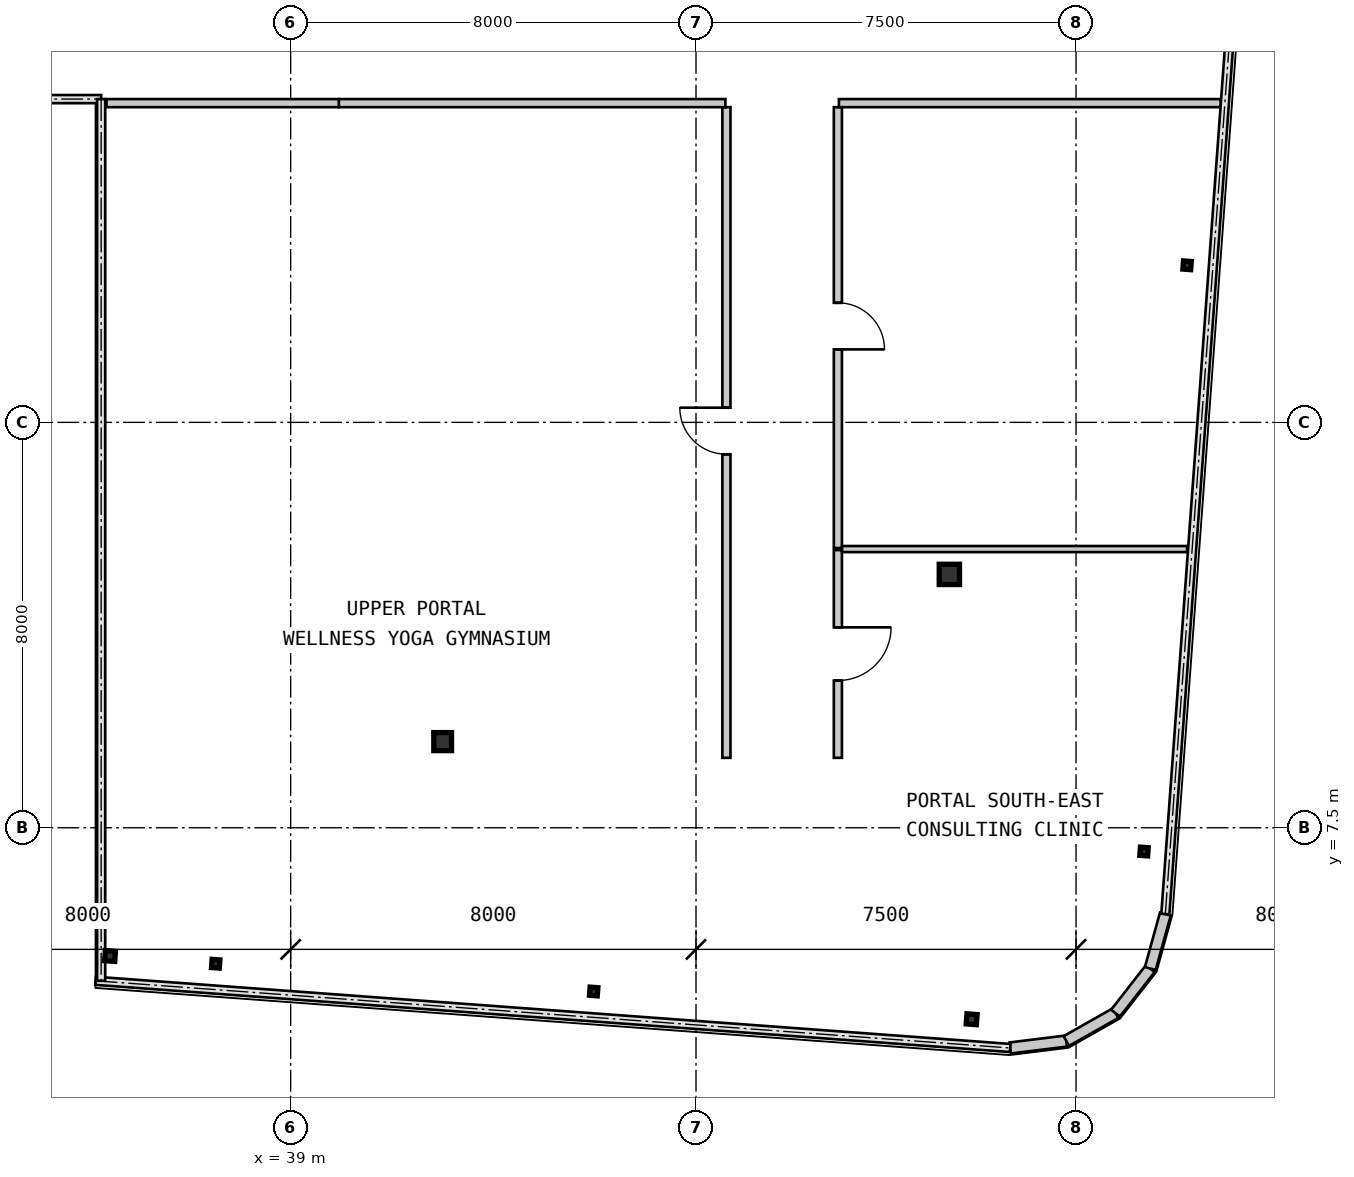
"""IFC4 building model, lengths in metres.
Left out: names, types, materials, properties, quantities, classifications, styles, units other than length and angle.
Written with IfcOpenShell. Run it as: python <this file> out.ifc"""

import sys

from ifc_helpers import new_model, si_unit, direction, frame, frame_2d, origin, origin_2d, place, context, subcontext, project, spatial, rectangle, hollow_rectangle, i_section, extrude, source, transform, mapped, element, fill, save


model = new_model("IFC4")
c1 = context("Model", 3, precision=1e-05, world=origin(), true_north=direction((0.0, 1.0)))
c2 = subcontext(c1, "Body", "Model", "MODEL_VIEW")
j1 = project(units=[si_unit("LENGTHUNIT", "METRE"), si_unit("PLANEANGLEUNIT", "RADIAN")], contexts=[c1])
p1 = place(None, origin())
s1 = spatial("IfcSite", under=j1, at=p1, CompositionType="ELEMENT")
p2 = place(p1, origin())
s2 = spatial("IfcBuilding", under=s1, at=p2, CompositionType="ELEMENT")
p3 = place(p2, frame((0.0, 0.0, 233.45)))
s3 = spatial("IfcBuildingStorey", under=s2, at=p3, CompositionType="ELEMENT", Elevation=233.45)
m1 = source(origin(), c2, "Body", "SweptSolid", [
    extrude(i_section(OverallWidth=0.35, OverallDepth=0.356, WebThickness=0.018, FlangeThickness=0.028, at=origin_2d()), origin(), (0.0, 0.0, 1.0), 3.15),
])
p4 = place(p3, frame((42.0, 9.2, 0.0), z_axis=(0.0, 0.0, 1.0), x_axis=(1.0, 0.0, 0.0)))
e1 = element("IfcColumn", 1, at=p4, inside=s3, PredefinedType="COLUMN", context=c2, shape_type="MappedRepresentation", body=[
    mapped(m1, transform((0.0, 0.0, 0.0), scale=1.0)),
])
m2 = source(origin(), c2, "Body", "SweptSolid", [
    extrude(hollow_rectangle(XDim=0.4, YDim=0.4, WallThickness=0.016, at=origin_2d()), origin(), (0.0, 0.0, 1.0), 3.15),
])
p5 = place(p3, frame((52.0, 12.5, 0.0), z_axis=(0.0, 0.0, 1.0), x_axis=(1.0, 0.0, 0.0)))
e2 = element("IfcColumn", 2, at=p5, inside=s3, PredefinedType="COLUMN", context=c2, shape_type="MappedRepresentation", body=[
    mapped(m2, transform((0.0, 0.0, 0.0), scale=1.0)),
])
m3 = source(origin(), c2, "Body", "SweptSolid", [
    extrude(i_section(OverallWidth=0.154, OverallDepth=0.162, WebThickness=0.008, FlangeThickness=0.011, at=origin_2d()), origin(), (0.0, 0.0, 1.0), 3.15),
])
for number, where, z_axis, x_axis in (
    (3, (37.521, 4.817, 0.0), (0.0, 0.0, 1.0), (0.997, -0.073, 0.0)),
    (4, (44.98, 4.269, 0.0), (0.0, 0.0, 1.0), (0.997, -0.073, 0.0)),
):
    element("IfcColumn", number, at=place(p3, frame(where, z_axis=z_axis, x_axis=x_axis)), inside=s3, PredefinedType="COLUMN", context=c2, shape_type="MappedRepresentation", body=[
        mapped(m3, transform((0.0, 0.0, 0.0), scale=1.0)),
    ])
m4 = source(origin(), c2, "Body", "SweptSolid", [
    extrude(hollow_rectangle(XDim=0.2, YDim=0.2, WallThickness=0.009, at=origin_2d()), origin(), (0.0, 0.0, 1.0), 3.15),
])
p6 = place(p3, frame((52.44, 3.721, 0.0), z_axis=(0.0, 0.0, 1.0), x_axis=(0.997314477224, -0.073238197128, 0.0)))
e5 = element("IfcColumn", 5, at=p6, inside=s3, PredefinedType="COLUMN", context=c2, shape_type="MappedRepresentation", body=[
    mapped(m4, transform((0.0, 0.0, 0.0), scale=1.0)),
])
for number, where, z_axis, x_axis in (
    (6, (55.842, 7.031, 0.0), (0.0, 0.0, 1.0), (0.997, -0.073, 0.0)),
    (7, (56.691, 18.6, 0.0), (0.0, 0.0, 1.0), (0.997, -0.073, 0.0)),
):
    element("IfcColumn", number, at=place(p3, frame(where, z_axis=z_axis, x_axis=x_axis)), inside=s3, PredefinedType="COLUMN", context=c2, shape_type="MappedRepresentation", body=[
        mapped(m3, transform((0.0, 0.0, 0.0), scale=1.0)),
    ])
p7 = place(p3, frame((35.436, 4.97, 0.0), z_axis=(0.0, 0.0, 1.0), x_axis=(0.997314477224, -0.073238197128, 0.0)))
e8 = element("IfcColumn", 8, at=p7, inside=s3, PredefinedType="COLUMN", context=c2, shape_type="MappedRepresentation", body=[
    mapped(m4, transform((0.0, 0.0, 0.0), scale=1.0)),
])
m5 = source(origin(), c2, "Body", "SweptSolid", [
    extrude(rectangle(XDim=1.116, YDim=0.22, at=frame_2d((0.558, 0.0))), origin(), (0.0, 0.0, 1.0), 2.87),
])
p8 = place(p3, frame((53.201, 3.154, 0.0), z_axis=(0.0, 0.0, 1.0), x_axis=(0.992438604032, 0.122742076028, 0.0)))
e9 = element("IfcWall", 9, at=p8, inside=s3, PredefinedType="SOLIDWALL", context=c2, shape_type="MappedRepresentation", body=[
    mapped(m5, transform((0.0, 0.0, 0.0), scale=1.0)),
])
m6 = source(origin(), c2, "Body", "SweptSolid", [
    extrude(rectangle(XDim=1.116, YDim=0.22, at=frame_2d((0.558, 0.0))), origin(), (0.0, 0.0, 1.0), 2.87),
])
p9 = place(p3, frame((54.308, 3.291, 0.0), z_axis=(0.0, 0.0, 1.0), x_axis=(0.869893934693, 0.49323882895, 0.0)))
e10 = element("IfcWall", 10, at=p9, inside=s3, PredefinedType="SOLIDWALL", context=c2, shape_type="MappedRepresentation", body=[
    mapped(m6, transform((0.0, 0.0, 0.0), scale=1.0)),
])
for number, where, z_axis, x_axis in (
    (11, (55.279, 3.841, 0.0), (0.0, 0.0, 1.0), (0.615, 0.789, 0.0)),
    (12, (55.965, 4.721, 0.0), (0.0, 0.0, 1.0), (0.266, 0.964, 0.0)),
):
    element("IfcWall", number, at=place(p3, frame(where, z_axis=z_axis, x_axis=x_axis)), inside=s3, PredefinedType="SOLIDWALL", context=c2, shape_type="MappedRepresentation", body=[
        mapped(m5, transform((0.0, 0.0, 0.0), scale=1.0)),
    ])
m7 = source(origin(), c2, "Body", "SweptSolid", [
    extrude(rectangle(XDim=12.84, YDim=0.16, at=frame_2d((6.42, 0.0))), origin(), (0.0, 0.0, 1.0), 2.87),
])
p10 = place(p3, frame((47.6, 8.88, 0.0), z_axis=(0.0, 0.0, 1.0), x_axis=(0.0, 1.0, 0.0)))
e13 = element("IfcWall", 13, at=p10, inside=s3, PredefinedType="PARTITIONING", context=c2, shape_type="MappedRepresentation", body=[
    mapped(m7, transform((0.0, 0.0, 0.0), scale=1.0)),
])
m8 = source(origin(), c2, "Body", "SweptSolid", [
    extrude(rectangle(XDim=0.92, YDim=2.1, at=frame_2d((0.46, 1.05))), frame((0.0, 0.09, 0.0), z_axis=(0.0, -1.0, 0.0), x_axis=(1.0, 0.0, 0.0)), (0.0, 0.0, 1.0), 0.18),
])
p11 = place(p10, frame((5.99, 0.0, 0.0)))
e14 = element("IfcOpeningElement", 14, at=p11, cuts=e13, PredefinedType="OPENING", context=c2, shape_type="MappedRepresentation", body=[
    mapped(m8, transform((0.0, 0.0, 0.0), scale=1.0)),
])
m9 = source(origin(), c2, "Body", "SweptSolid", [
    extrude(rectangle(XDim=7.63, YDim=0.16, at=frame_2d((3.815, 0.0))), origin(), (0.0, 0.0, 1.0), 2.87),
])
p12 = place(p3, frame((47.58, 21.8, 0.0), z_axis=(0.0, 0.0, 1.0), x_axis=(-1.0, 0.0, 0.0)))
e15 = element("IfcWall", 15, at=p12, inside=s3, PredefinedType="PARTITIONING", context=c2, shape_type="MappedRepresentation", body=[
    mapped(m9, transform((0.0, 0.0, 0.0), scale=1.0)),
])
m10 = source(origin(), c2, "Body", "SweptSolid", [
    extrude(rectangle(XDim=4.584, YDim=0.16, at=frame_2d((2.292, 0.0))), origin(), (0.0, 0.0, 1.0), 2.17),
])
p13 = place(p3, frame((39.95, 21.8, 0.0), z_axis=(0.0, 0.0, 1.0), x_axis=(-1.0, 0.0, 0.0)))
e16 = element("IfcWall", 16, at=p13, inside=s3, PredefinedType="PARTITIONING", context=c2, shape_type="MappedRepresentation", body=[
    mapped(m10, transform((0.0, 0.0, 0.0), scale=1.0)),
])
m11 = source(origin(), c2, "Body", "SweptSolid", [
    extrude(rectangle(XDim=4.1, YDim=0.16, at=frame_2d((2.05, 0.0))), origin(), (0.0, 0.0, 1.0), 2.87),
])
p14 = place(p3, frame((49.8, 12.98, 0.0), z_axis=(0.0, 0.0, 1.0), x_axis=(0.0, -1.0, 0.0)))
e17 = element("IfcWall", 17, at=p14, inside=s3, PredefinedType="PARTITIONING", context=c2, shape_type="MappedRepresentation", body=[
    mapped(m11, transform((0.0, 0.0, 0.0), scale=1.0)),
])
m12 = source(origin(), c2, "Body", "SweptSolid", [
    extrude(rectangle(XDim=1.05, YDim=2.1, at=frame_2d((0.525, 1.05))), frame((0.0, 0.09, 0.0), z_axis=(0.0, -1.0, 0.0), x_axis=(1.0, 0.0, 0.0)), (0.0, 0.0, 1.0), 0.18),
])
p15 = place(p14, frame((1.525, 0.0, 0.0)))
e18 = element("IfcOpeningElement", 18, at=p15, cuts=e17, PredefinedType="OPENING", context=c2, shape_type="MappedRepresentation", body=[
    mapped(m12, transform((0.0, 0.0, 0.0), scale=1.0)),
])
m13 = source(origin(), c2, "Body", "SweptSolid", [
    extrude(rectangle(XDim=8.7, YDim=0.16, at=frame_2d((4.35, 0.0))), origin(), (0.0, 0.0, 1.0), 2.87),
])
p16 = place(p3, frame((49.8, 21.72, 0.0), z_axis=(0.0, 0.0, 1.0), x_axis=(0.0, -1.0, 0.0)))
e19 = element("IfcWall", 19, at=p16, inside=s3, PredefinedType="PARTITIONING", context=c2, shape_type="MappedRepresentation", body=[
    mapped(m13, transform((0.0, 0.0, 0.0), scale=1.0)),
])
p17 = place(p16, frame((3.86, 0.0, 0.0)))
e20 = element("IfcOpeningElement", 20, at=p17, cuts=e19, PredefinedType="OPENING", context=c2, shape_type="MappedRepresentation", body=[
    mapped(m8, transform((0.0, 0.0, 0.0), scale=1.0)),
])
m14 = source(origin(), c2, "Body", "SweptSolid", [
    extrude(rectangle(XDim=7.533, YDim=0.16, at=frame_2d((3.767, 0.0))), origin(), (0.0, 0.0, 1.0), 2.87),
])
p18 = place(p3, frame((57.353, 21.8, 0.0), z_axis=(0.0, 0.0, 1.0), x_axis=(-1.0, 0.0, 0.0)))
e21 = element("IfcWall", 21, at=p18, inside=s3, PredefinedType="PARTITIONING", context=c2, shape_type="MappedRepresentation", body=[
    mapped(m14, transform((0.0, 0.0, 0.0), scale=1.0)),
])
m15 = source(origin(), c2, "Body", "SweptSolid", [
    extrude(rectangle(XDim=6.811, YDim=0.12, at=frame_2d((3.406, 0.0))), origin(), (0.0, 0.0, 1.0), 2.87),
])
p19 = place(p3, frame((49.882, 13.0, 0.0), z_axis=(0.0, 0.0, 1.0), x_axis=(1.0, 0.0, 0.0)))
e22 = element("IfcWall", 22, at=p19, inside=s3, PredefinedType="PARTITIONING", context=c2, shape_type="MappedRepresentation", body=[
    mapped(m15, transform((0.0, 0.0, 0.0), scale=1.0)),
])
m16 = source(origin(), c2, "Body", "SweptSolid", [
    extrude(rectangle(XDim=0.92, YDim=2.1, at=frame_2d((0.46, 1.05))), frame((0.0, 0.025, 0.0), z_axis=(0.0, -1.0, 0.0), x_axis=(1.0, 0.0, 0.0)), (0.0, 0.0, 1.0), 0.05),
])
p20 = place(p11, origin())
e23 = element("IfcDoor", 23, at=p20, inside=s3, OperationType="SINGLE_SWING_RIGHT", PredefinedType="DOOR", context=c2, shape_type="MappedRepresentation", body=[
    mapped(m16, transform((0.0, 0.0, 0.0), scale=1.0)),
])
fill(e14, e23)
m17 = source(origin(), c2, "Body", "SweptSolid", [
    extrude(rectangle(XDim=1.05, YDim=2.1, at=frame_2d((0.525, 1.05))), frame((0.0, 0.025, 0.0), z_axis=(0.0, -1.0, 0.0), x_axis=(1.0, 0.0, 0.0)), (0.0, 0.0, 1.0), 0.05),
])
p21 = place(p15, origin())
e24 = element("IfcDoor", 24, at=p21, inside=s3, OperationType="SINGLE_SWING_LEFT", PredefinedType="DOOR", context=c2, shape_type="MappedRepresentation", body=[
    mapped(m17, transform((0.0, 0.0, 0.0), scale=1.0)),
])
fill(e18, e24)
p22 = place(p17, origin())
e25 = element("IfcDoor", 25, at=p22, inside=s3, OperationType="SINGLE_SWING_RIGHT", PredefinedType="DOOR", context=c2, shape_type="MappedRepresentation", body=[
    mapped(m16, transform((0.0, 0.0, 0.0), scale=1.0)),
])
fill(e20, e25)
save(model, sys.argv[1])
